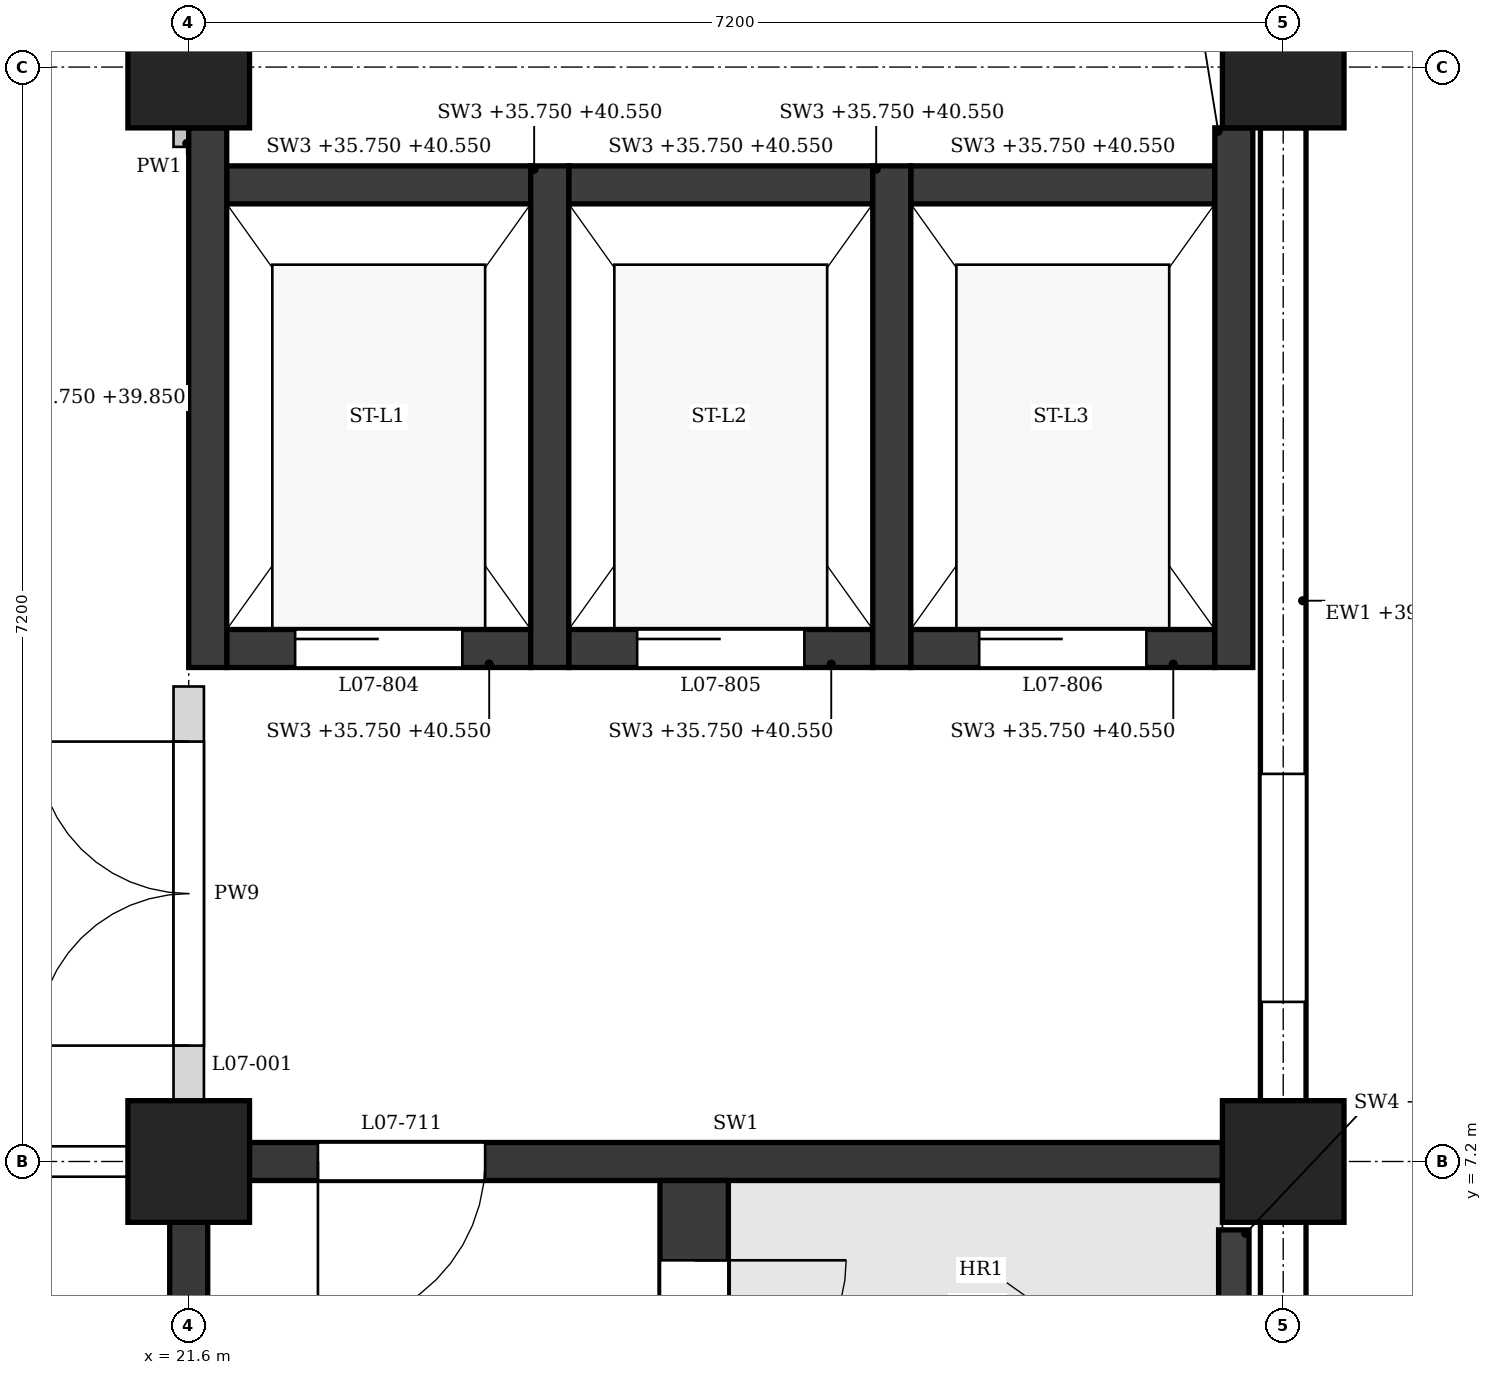
"""IFC4 building model, lengths in metres.
Left out: names, types, materials, properties, quantities, classifications, styles, units other than length and angle.
Written with IfcOpenShell. Run it as: python <this file> out.ifc"""

import sys

from ifc_helpers import new_model, si_unit, direction, frame, frame_2d, origin, origin_2d, place, context, subcontext, project, spatial, polyline, rectangle, outline, extrude, element, fill, save


model = new_model("IFC4")
c1 = context("Model", 3, precision=1e-05, world=origin(), true_north=direction((0.0, 1.0)))
c2 = subcontext(c1, "Body", "Model", "MODEL_VIEW")
j1 = project(units=[si_unit("LENGTHUNIT", "METRE"), si_unit("PLANEANGLEUNIT", "RADIAN")], contexts=[c1])
p1 = place(None, origin())
s1 = spatial("IfcSite", under=j1, at=p1, CompositionType="ELEMENT")
p2 = place(p1, origin())
s2 = spatial("IfcBuilding", under=s1, at=p2, CompositionType="ELEMENT")
p3 = place(p2, frame((0.0, 0.0, 36.0)))
s3 = spatial("IfcBuildingStorey", under=s2, at=p3, CompositionType="ELEMENT", Elevation=36.0)
for number, where, z_axis, x_axis in (
    (1, (21.6, 7.2, 0.0), (0.0, 0.0, 1.0), (1.0, 0.0, 0.0)),
    (2, (21.6, 14.4, 0.0), (0.0, 0.0, 1.0), (1.0, 0.0, 0.0)),
    (3, (28.8, 7.2, 0.0), (0.0, 0.0, 1.0), (1.0, 0.0, 0.0)),
    (4, (28.8, 14.4, 0.0), (0.0, 0.0, 1.0), (1.0, 0.0, 0.0)),
):
    element("IfcColumn", number, at=place(p3, frame(where, z_axis=z_axis, x_axis=x_axis)), inside=s3, PredefinedType="COLUMN", context=c2, shape_type="SweptSolid", body=[
        extrude(rectangle(XDim=0.8, YDim=0.8, at=origin_2d()), origin(), (0.0, 0.0, 1.0), 4.8),
    ])
p4 = place(p3, frame((28.8, 0.4, 0.0), z_axis=(0.0, 0.0, 1.0), x_axis=(0.0, 1.0, 0.0)))
e5 = element("IfcWall", 5, at=p4, inside=s3, PredefinedType="STANDARD", context=c2, shape_type="SweptSolid", body=[
    extrude(rectangle(XDim=6.4, YDim=0.3, at=frame_2d((3.2, 0.0))), origin(), (0.0, 0.0, 1.0), 3.95),
])
p5 = place(p4, frame((0.95, 0.0, 0.9)))
e6 = element("IfcOpeningElement", 6, at=p5, cuts=e5, PredefinedType="OPENING", context=c2, shape_type="SweptSolid", body=[
    extrude(outline(polyline([(0.0, 0.0), (0.9, 0.0), (0.9, 2.55), (0.45, 3.0), (0.0, 2.55), (0.0, 0.0)])), frame((0.0, 0.16, 0.0), z_axis=(0.0, -1.0, 0.0), x_axis=(1.0, 0.0, 0.0)), (0.0, 0.0, 1.0), 0.32),
])
p6 = place(p4, frame((4.55, 0.0, 0.9)))
e7 = element("IfcOpeningElement", 7, at=p6, cuts=e5, PredefinedType="OPENING", context=c2, shape_type="SweptSolid", body=[
    extrude(outline(polyline([(0.0, 0.0), (0.9, 0.0), (0.9, 2.55), (0.45, 3.0), (0.0, 2.55), (0.0, 0.0)])), frame((0.0, 0.16, 0.0), z_axis=(0.0, -1.0, 0.0), x_axis=(1.0, 0.0, 0.0)), (0.0, 0.0, 1.0), 0.32),
])
p7 = place(p3, frame((28.8, 7.6, 0.0), z_axis=(0.0, 0.0, 1.0), x_axis=(0.0, 1.0, 0.0)))
e8 = element("IfcWall", 8, at=p7, inside=s3, PredefinedType="STANDARD", context=c2, shape_type="SweptSolid", body=[
    extrude(rectangle(XDim=6.4, YDim=0.3, at=frame_2d((3.2, 0.0))), origin(), (0.0, 0.0, 1.0), 3.95),
])
p8 = place(p7, frame((0.65, 0.0, 0.9)))
e9 = element("IfcOpeningElement", 9, at=p8, cuts=e8, PredefinedType="OPENING", context=c2, shape_type="SweptSolid", body=[
    extrude(outline(polyline([(0.0, 0.0), (1.5, 0.0), (1.5, 2.25), (0.75, 3.0), (0.0, 2.25), (0.0, 0.0)])), frame((0.0, 0.16, 0.0), z_axis=(0.0, -1.0, 0.0), x_axis=(1.0, 0.0, 0.0)), (0.0, 0.0, 1.0), 0.32),
])
p9 = place(p3, frame((22.0, 7.2, 0.0), z_axis=(0.0, 0.0, 1.0), x_axis=(1.0, 0.0, 0.0)))
e10 = element("IfcWall", 10, at=p9, inside=s3, PredefinedType="SHEAR", context=c2, shape_type="SweptSolid", body=[
    extrude(rectangle(XDim=6.4, YDim=0.25, at=frame_2d((3.2, 0.0))), origin(), (0.0, 0.0, 1.0), 3.85),
])
p10 = place(p9, frame((0.45, 0.0, 0.0)))
e11 = element("IfcOpeningElement", 11, at=p10, cuts=e10, PredefinedType="OPENING", context=c2, shape_type="SweptSolid", body=[
    extrude(rectangle(XDim=1.1, YDim=2.1, at=frame_2d((0.55, 1.05))), frame((0.0, 0.135, 0.0), z_axis=(0.0, -1.0, 0.0), x_axis=(1.0, 0.0, 0.0)), (0.0, 0.0, 1.0), 0.27),
])
p11 = place(p3, frame((21.6, 0.4, 0.0), z_axis=(0.0, 0.0, 1.0), x_axis=(0.0, 1.0, 0.0)))
e12 = element("IfcWall", 12, at=p11, inside=s3, PredefinedType="SHEAR", context=c2, shape_type="SweptSolid", body=[
    extrude(rectangle(XDim=6.4, YDim=0.25, at=frame_2d((3.2, 0.0))), origin(), (0.0, 0.0, 1.0), 3.85),
])
p12 = place(p3, frame((28.475, 5.85, -0.25), z_axis=(0.0, 0.0, 1.0), x_axis=(0.0, 1.0, 0.0)))
e13 = element("IfcWall", 13, at=p12, inside=s3, PredefinedType="SHEAR", context=c2, shape_type="SweptSolid", body=[
    extrude(rectangle(XDim=0.9, YDim=0.2, at=frame_2d((0.45, 0.0))), origin(), (0.0, 0.0, 1.0), 4.8),
])
p13 = place(p3, frame((24.925, 0.225, 0.0), z_axis=(0.0, 0.0, 1.0), x_axis=(0.0, 1.0, 0.0)))
e14 = element("IfcWall", 14, at=p13, inside=s3, PredefinedType="SHEAR", context=c2, shape_type="SweptSolid", body=[
    extrude(rectangle(XDim=6.85, YDim=0.45, at=frame_2d((3.425, 0.0))), origin(), (0.0, 0.0, 1.0), 4.55),
])
p14 = place(p13, frame((5.325, 0.0, 0.0)))
e15 = element("IfcOpeningElement", 15, at=p14, cuts=e14, PredefinedType="OPENING", context=c2, shape_type="SweptSolid", body=[
    extrude(rectangle(XDim=1.0, YDim=2.1, at=frame_2d((0.5, 1.05))), frame((0.0, 0.235, 0.0), z_axis=(0.0, -1.0, 0.0), x_axis=(1.0, 0.0, 0.0)), (0.0, 0.0, 1.0), 0.47),
])
p15 = place(p3, frame((21.725, 10.45, -0.25), z_axis=(0.0, 0.0, 1.0), x_axis=(0.0, 1.0, 0.0)))
e16 = element("IfcWall", 16, at=p15, inside=s3, PredefinedType="SHEAR", context=c2, shape_type="SweptSolid", body=[
    extrude(rectangle(XDim=3.55, YDim=0.25, at=frame_2d((1.775, 0.0))), origin(), (0.0, 0.0, 1.0), 4.1),
])
for number, where, z_axis, x_axis in (
    (17, (23.975, 10.45, -0.25), (0.0, 0.0, 1.0), (0.0, 1.0, 0.0)),
    (18, (26.225, 10.45, -0.25), (0.0, 0.0, 1.0), (0.0, 1.0, 0.0)),
):
    element("IfcWall", number, at=place(p3, frame(where, z_axis=z_axis, x_axis=x_axis)), inside=s3, PredefinedType="SHEAR", context=c2, shape_type="SweptSolid", body=[
        extrude(rectangle(XDim=3.3, YDim=0.25, at=frame_2d((1.65, 0.0))), origin(), (0.0, 0.0, 1.0), 4.8),
    ])
p16 = place(p3, frame((28.475, 10.45, -0.25), z_axis=(0.0, 0.0, 1.0), x_axis=(0.0, 1.0, 0.0)))
e19 = element("IfcWall", 19, at=p16, inside=s3, PredefinedType="SHEAR", context=c2, shape_type="SweptSolid", body=[
    extrude(rectangle(XDim=3.55, YDim=0.25, at=frame_2d((1.775, 0.0))), origin(), (0.0, 0.0, 1.0), 4.8),
])
p17 = place(p3, frame((21.85, 10.575, -0.25), z_axis=(0.0, 0.0, 1.0), x_axis=(1.0, 0.0, 0.0)))
e20 = element("IfcWall", 20, at=p17, inside=s3, PredefinedType="SHEAR", context=c2, shape_type="SweptSolid", body=[
    extrude(rectangle(XDim=2.0, YDim=0.25, at=frame_2d((1.0, 0.0))), origin(), (0.0, 0.0, 1.0), 4.8),
])
p18 = place(p17, frame((0.45, 0.0, 0.25)))
e21 = element("IfcOpeningElement", 21, at=p18, cuts=e20, PredefinedType="OPENING", context=c2, shape_type="SweptSolid", body=[
    extrude(rectangle(XDim=1.1, YDim=2.1, at=frame_2d((0.55, 1.05))), frame((0.0, 0.135, 0.0), z_axis=(0.0, -1.0, 0.0), x_axis=(1.0, 0.0, 0.0)), (0.0, 0.0, 1.0), 0.27),
])
p19 = place(p3, frame((21.85, 13.625, -0.25), z_axis=(0.0, 0.0, 1.0), x_axis=(1.0, 0.0, 0.0)))
e22 = element("IfcWall", 22, at=p19, inside=s3, PredefinedType="SHEAR", context=c2, shape_type="SweptSolid", body=[
    extrude(rectangle(XDim=2.0, YDim=0.25, at=frame_2d((1.0, 0.0))), origin(), (0.0, 0.0, 1.0), 4.8),
])
p20 = place(p3, frame((24.1, 10.575, -0.25), z_axis=(0.0, 0.0, 1.0), x_axis=(1.0, 0.0, 0.0)))
e23 = element("IfcWall", 23, at=p20, inside=s3, PredefinedType="SHEAR", context=c2, shape_type="SweptSolid", body=[
    extrude(rectangle(XDim=2.0, YDim=0.25, at=frame_2d((1.0, 0.0))), origin(), (0.0, 0.0, 1.0), 4.8),
])
p21 = place(p20, frame((0.45, 0.0, 0.25)))
e24 = element("IfcOpeningElement", 24, at=p21, cuts=e23, PredefinedType="OPENING", context=c2, shape_type="SweptSolid", body=[
    extrude(rectangle(XDim=1.1, YDim=2.1, at=frame_2d((0.55, 1.05))), frame((0.0, 0.135, 0.0), z_axis=(0.0, -1.0, 0.0), x_axis=(1.0, 0.0, 0.0)), (0.0, 0.0, 1.0), 0.27),
])
p22 = place(p3, frame((24.1, 13.625, -0.25), z_axis=(0.0, 0.0, 1.0), x_axis=(1.0, 0.0, 0.0)))
e25 = element("IfcWall", 25, at=p22, inside=s3, PredefinedType="SHEAR", context=c2, shape_type="SweptSolid", body=[
    extrude(rectangle(XDim=2.0, YDim=0.25, at=frame_2d((1.0, 0.0))), origin(), (0.0, 0.0, 1.0), 4.8),
])
p23 = place(p3, frame((26.35, 10.575, -0.25), z_axis=(0.0, 0.0, 1.0), x_axis=(1.0, 0.0, 0.0)))
e26 = element("IfcWall", 26, at=p23, inside=s3, PredefinedType="SHEAR", context=c2, shape_type="SweptSolid", body=[
    extrude(rectangle(XDim=2.0, YDim=0.25, at=frame_2d((1.0, 0.0))), origin(), (0.0, 0.0, 1.0), 4.8),
])
p24 = place(p23, frame((0.45, 0.0, 0.25)))
e27 = element("IfcOpeningElement", 27, at=p24, cuts=e26, PredefinedType="OPENING", context=c2, shape_type="SweptSolid", body=[
    extrude(rectangle(XDim=1.1, YDim=2.1, at=frame_2d((0.55, 1.05))), frame((0.0, 0.135, 0.0), z_axis=(0.0, -1.0, 0.0), x_axis=(1.0, 0.0, 0.0)), (0.0, 0.0, 1.0), 0.27),
])
p25 = place(p3, frame((26.35, 13.625, -0.25), z_axis=(0.0, 0.0, 1.0), x_axis=(1.0, 0.0, 0.0)))
e28 = element("IfcWall", 28, at=p25, inside=s3, PredefinedType="SHEAR", context=c2, shape_type="SweptSolid", body=[
    extrude(rectangle(XDim=2.0, YDim=0.25, at=frame_2d((1.0, 0.0))), origin(), (0.0, 0.0, 1.0), 4.8),
])
p26 = place(p3, frame((14.8, 7.2, 0.0), z_axis=(0.0, 0.0, 1.0), x_axis=(1.0, 0.0, 0.0)))
e29 = element("IfcWall", 29, at=p26, inside=s3, PredefinedType="PARTITIONING", context=c2, shape_type="SweptSolid", body=[
    extrude(rectangle(XDim=6.4, YDim=0.2, at=frame_2d((3.2, 0.0))), origin(), (0.0, 0.0, 1.0), 3.85),
])
p27 = place(p26, frame((4.3, 0.0, 0.0)))
e30 = element("IfcOpeningElement", 30, at=p27, cuts=e29, PredefinedType="OPENING", context=c2, shape_type="SweptSolid", body=[
    extrude(rectangle(XDim=1.0, YDim=2.1, at=frame_2d((0.5, 1.05))), frame((0.0, 0.11, 0.0), z_axis=(0.0, -1.0, 0.0), x_axis=(1.0, 0.0, 0.0)), (0.0, 0.0, 1.0), 0.22),
])
p28 = place(p3, frame((21.6, 7.6, 0.0), z_axis=(0.0, 0.0, 1.0), x_axis=(0.0, 1.0, 0.0)))
e31 = element("IfcWall", 31, at=p28, inside=s3, PredefinedType="PARTITIONING", context=c2, shape_type="SweptSolid", body=[
    extrude(rectangle(XDim=2.725, YDim=0.2, at=frame_2d((1.362, 0.0))), origin(), (0.0, 0.0, 1.0), 3.85),
])
p29 = place(p28, frame((0.362, 0.0, 0.0)))
e32 = element("IfcOpeningElement", 32, at=p29, cuts=e31, PredefinedType="OPENING", context=c2, shape_type="SweptSolid", body=[
    extrude(rectangle(XDim=2.0, YDim=2.4, at=frame_2d((1.0, 1.2))), frame((0.0, 0.11, 0.0), z_axis=(0.0, -1.0, 0.0), x_axis=(1.0, 0.0, 0.0)), (0.0, 0.0, 1.0), 0.22),
])
p30 = place(p3, frame((21.6, 13.875, 0.0), z_axis=(0.0, 0.0, 1.0), x_axis=(0.0, 1.0, 0.0)))
e33 = element("IfcWall", 33, at=p30, inside=s3, PredefinedType="PARTITIONING", context=c2, shape_type="SweptSolid", body=[
    extrude(rectangle(XDim=0.125, YDim=0.2, at=frame_2d((0.062, 0.0))), origin(), (0.0, 0.0, 1.0), 3.85),
])
p31 = place(p8, origin())
e34 = element("IfcWindow", 34, at=p31, inside=s3, PartitioningType="SINGLE_PANEL", PredefinedType="WINDOW", context=c2, shape_type="SweptSolid", body=[
    extrude(outline(polyline([(0.0, 0.0), (1.5, 0.0), (1.5, 2.25), (0.75, 3.0), (0.0, 2.25), (0.0, 0.0)])), frame((0.0, 0.03, 0.0), z_axis=(0.0, -1.0, 0.0), x_axis=(1.0, 0.0, 0.0)), (0.0, 0.0, 1.0), 0.06),
])
fill(e9, e34)
p32 = place(p14, frame((1.0, 0.0, 0.0), z_axis=(0.0, 0.0, 1.0), x_axis=(-1.0, 0.0, 0.0)))
e35 = element("IfcDoor", 35, at=p32, inside=s3, OperationType="SINGLE_SWING_LEFT", PredefinedType="DOOR", context=c2, shape_type="SweptSolid", body=[
    extrude(rectangle(XDim=1.0, YDim=2.1, at=frame_2d((0.5, 1.05))), frame((0.0, 0.025, 0.0), z_axis=(0.0, -1.0, 0.0), x_axis=(1.0, 0.0, 0.0)), (0.0, 0.0, 1.0), 0.05),
])
fill(e15, e35)
p33 = place(p10, frame((1.1, 0.0, 0.0), z_axis=(0.0, 0.0, 1.0), x_axis=(-1.0, 0.0, 0.0)))
e36 = element("IfcDoor", 36, at=p33, inside=s3, OperationType="SINGLE_SWING_RIGHT", PredefinedType="DOOR", context=c2, shape_type="SweptSolid", body=[
    extrude(rectangle(XDim=1.1, YDim=2.1, at=frame_2d((0.55, 1.05))), frame((0.0, 0.025, 0.0), z_axis=(0.0, -1.0, 0.0), x_axis=(1.0, 0.0, 0.0)), (0.0, 0.0, 1.0), 0.05),
])
fill(e11, e36)
p34 = place(p18, origin())
e37 = element("IfcDoor", 37, at=p34, inside=s3, OperationType="SLIDING_TO_LEFT", PredefinedType="DOOR", context=c2, shape_type="SweptSolid", body=[
    extrude(rectangle(XDim=1.1, YDim=2.1, at=frame_2d((0.55, 1.05))), frame((0.0, 0.025, 0.0), z_axis=(0.0, -1.0, 0.0), x_axis=(1.0, 0.0, 0.0)), (0.0, 0.0, 1.0), 0.05),
])
fill(e21, e37)
p35 = place(p21, origin())
e38 = element("IfcDoor", 38, at=p35, inside=s3, OperationType="SLIDING_TO_LEFT", PredefinedType="DOOR", context=c2, shape_type="SweptSolid", body=[
    extrude(rectangle(XDim=1.1, YDim=2.1, at=frame_2d((0.55, 1.05))), frame((0.0, 0.025, 0.0), z_axis=(0.0, -1.0, 0.0), x_axis=(1.0, 0.0, 0.0)), (0.0, 0.0, 1.0), 0.05),
])
fill(e24, e38)
p36 = place(p24, origin())
e39 = element("IfcDoor", 39, at=p36, inside=s3, OperationType="SLIDING_TO_LEFT", PredefinedType="DOOR", context=c2, shape_type="SweptSolid", body=[
    extrude(rectangle(XDim=1.1, YDim=2.1, at=frame_2d((0.55, 1.05))), frame((0.0, 0.025, 0.0), z_axis=(0.0, -1.0, 0.0), x_axis=(1.0, 0.0, 0.0)), (0.0, 0.0, 1.0), 0.05),
])
fill(e27, e39)
p37 = place(p29, origin())
e40 = element("IfcDoor", 40, at=p37, inside=s3, OperationType="DOUBLE_DOOR_SINGLE_SWING", PredefinedType="DOOR", context=c2, shape_type="SweptSolid", body=[
    extrude(rectangle(XDim=2.0, YDim=2.4, at=frame_2d((1.0, 1.2))), frame((0.0, 0.025, 0.0), z_axis=(0.0, -1.0, 0.0), x_axis=(1.0, 0.0, 0.0)), (0.0, 0.0, 1.0), 0.05),
])
fill(e32, e40)
save(model, sys.argv[1])
